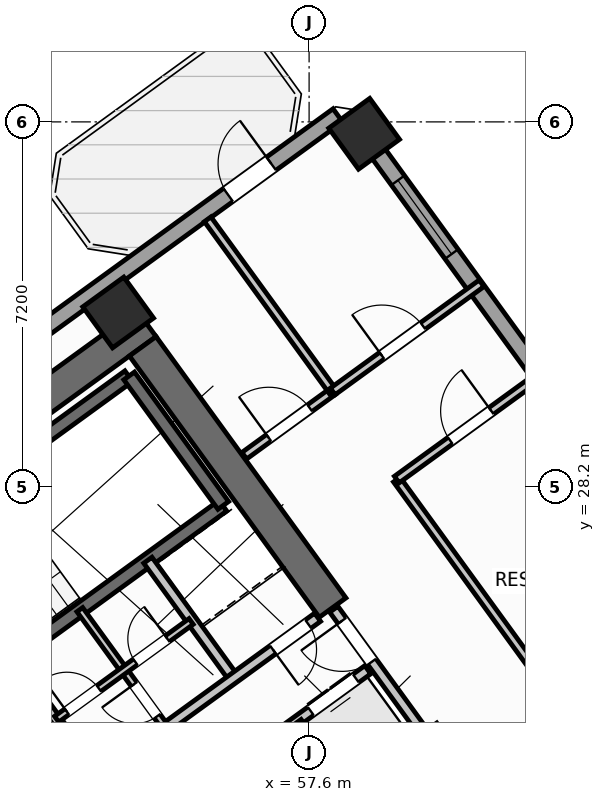
"""IFC4 building model, lengths in metres.
Left out: names, types, materials, properties, quantities, classifications, styles, units other than length and angle.
Written with IfcOpenShell. Run it as: python <this file> out.ifc"""

import sys

from ifc_helpers import new_model, si_unit, direction, frame, frame_2d, origin, origin_2d, place, context, subcontext, project, spatial, rectangle, hollow_rectangle, extrude, source, transform, mapped, element, fill, save


model = new_model("IFC4")
c1 = context("Model", 3, precision=1e-05, world=origin(), true_north=direction((0.0, 1.0)))
c2 = subcontext(c1, "Body", "Model", "MODEL_VIEW")
j1 = project(units=[si_unit("LENGTHUNIT", "METRE"), si_unit("PLANEANGLEUNIT", "RADIAN")], contexts=[c1])
p1 = place(None, origin())
s1 = spatial("IfcSite", under=j1, at=p1, CompositionType="ELEMENT")
p2 = place(p1, origin())
s2 = spatial("IfcBuilding", under=s1, at=p2, CompositionType="ELEMENT")
p3 = place(p2, frame((0.0, 0.0, 42.0)))
s3 = spatial("IfcBuildingStorey", under=s2, at=p3, CompositionType="ELEMENT", Elevation=42.0)
p4 = place(p3, frame((44.325, 24.113, 0.0), z_axis=(0.0, 0.0, 1.0), x_axis=(0.809012664862, 0.58779121131, 0.0)))
e1 = element("IfcWall", 1, at=p4, inside=s3, PredefinedType="SHEAR", context=c2, shape_type="SweptSolid", body=[
    extrude(rectangle(XDim=12.44, YDim=0.65, at=frame_2d((6.22, 0.0))), origin(), (0.0, 0.0, 1.0), 3.35),
])
p5 = place(p3, frame((58.064, 25.813, 0.0), z_axis=(0.0, 0.0, 1.0), x_axis=(-0.58777996584, 0.809020835181, 0.0)))
e2 = element("IfcWall", 2, at=p5, inside=s3, PredefinedType="SHEAR", context=c2, shape_type="SweptSolid", body=[
    extrude(rectangle(XDim=6.375, YDim=0.65, at=frame_2d((3.188, 0.0))), origin(), (0.0, 0.0, 1.0), 3.35),
])
m1 = source(origin(), c2, "Body", "SweptSolid", [
    extrude(hollow_rectangle(XDim=1.0, YDim=1.0, WallThickness=0.04, at=origin_2d()), origin(), (0.0, 0.0, 1.0), 3.6),
])
for number, where, z_axis, x_axis in (
    (3, (53.832, 31.638, 0.0), (0.0, 0.0, 1.0), (0.809, 0.588, 0.0)),
    (4, (58.686, 35.165, 0.0), (0.0, 0.0, 1.0), (0.809, 0.588, 0.0)),
):
    element("IfcColumn", number, at=place(p3, frame(where, z_axis=z_axis, x_axis=x_axis)), inside=s3, PredefinedType="COLUMN", context=c2, shape_type="MappedRepresentation", body=[
        mapped(m1, transform((0.0, 0.0, 0.0), scale=1.0)),
    ])
p6 = place(p3, frame((43.938, 25.192, 0.0), z_axis=(0.0, 0.0, 1.0), x_axis=(0.809016324578, 0.587786174187, 0.0)))
e5 = element("IfcWall", 5, at=p6, inside=s3, PredefinedType="STANDARD", context=c2, shape_type="SweptSolid", body=[
    extrude(rectangle(XDim=17.587, YDim=0.32, at=frame_2d((8.794, 0.0))), origin(), (0.0, 0.0, 1.0), 3.35),
])
p7 = place(p6, frame((14.914, 0.0, 0.0)))
e6 = element("IfcOpeningElement", 6, at=p7, cuts=e5, PredefinedType="OPENING", context=c2, shape_type="SweptSolid", body=[
    extrude(rectangle(XDim=1.05, YDim=2.15, at=frame_2d((0.525, 1.075))), frame((0.0, 0.17, 0.0), z_axis=(0.0, -1.0, 0.0), x_axis=(1.0, 0.0, 0.0)), (0.0, 0.0, 1.0), 0.34),
])
p8 = place(p6, frame((2.169, 0.0, 0.8)))
e7 = element("IfcOpeningElement", 7, at=p8, cuts=e5, PredefinedType="OPENING", context=c2, shape_type="SweptSolid", body=[
    extrude(rectangle(XDim=2.1, YDim=1.55, at=frame_2d((1.05, 0.775))), frame((0.0, 0.17, 0.0), z_axis=(0.0, -1.0, 0.0), x_axis=(1.0, 0.0, 0.0)), (0.0, 0.0, 1.0), 0.34),
])
p9 = place(p6, frame((7.319, 0.0, 0.8)))
e8 = element("IfcOpeningElement", 8, at=p9, cuts=e5, PredefinedType="OPENING", context=c2, shape_type="SweptSolid", body=[
    extrude(rectangle(XDim=2.1, YDim=1.55, at=frame_2d((1.05, 0.775))), frame((0.0, 0.17, 0.0), z_axis=(0.0, -1.0, 0.0), x_axis=(1.0, 0.0, 0.0)), (0.0, 0.0, 1.0), 0.34),
])
p10 = place(p3, frame((58.455, 35.484, 0.0), z_axis=(0.0, 0.0, 1.0), x_axis=(0.587783625747, -0.809018176127, 0.0)))
e9 = element("IfcWall", 9, at=p10, inside=s3, PredefinedType="STANDARD", context=c2, shape_type="SweptSolid", body=[
    extrude(rectangle(XDim=21.587, YDim=0.32, at=frame_2d((10.794, 0.0))), origin(), (0.0, 0.0, 1.0), 2.725),
])
p11 = place(p10, frame((1.529, 0.0, 0.85)))
e10 = element("IfcOpeningElement", 10, at=p11, cuts=e9, PredefinedType="OPENING", context=c2, shape_type="SweptSolid", body=[
    extrude(rectangle(XDim=1.8, YDim=1.5, at=frame_2d((0.9, 0.75))), frame((0.0, 0.17, 0.0), z_axis=(0.0, -1.0, 0.0), x_axis=(1.0, 0.0, 0.0)), (0.0, 0.0, 1.0), 0.34),
])
p12 = place(p10, frame((10.444, 0.0, 0.85)))
e11 = element("IfcOpeningElement", 11, at=p12, cuts=e9, PredefinedType="OPENING", context=c2, shape_type="SweptSolid", body=[
    extrude(rectangle(XDim=1.8, YDim=1.5, at=frame_2d((0.9, 0.75))), frame((0.0, 0.17, 0.0), z_axis=(0.0, -1.0, 0.0), x_axis=(1.0, 0.0, 0.0)), (0.0, 0.0, 1.0), 0.34),
])
p13 = place(p10, frame((17.595, 0.0, 0.85)))
e12 = element("IfcOpeningElement", 12, at=p13, cuts=e9, PredefinedType="OPENING", context=c2, shape_type="SweptSolid", body=[
    extrude(rectangle(XDim=1.5, YDim=1.5, at=frame_2d((0.75, 0.75))), frame((0.0, 0.17, 0.0), z_axis=(0.0, -1.0, 0.0), x_axis=(1.0, 0.0, 0.0)), (0.0, 0.0, 1.0), 0.34),
])
p14 = place(p3, frame((48.006, 25.996, 0.0), z_axis=(0.0, 0.0, 1.0), x_axis=(0.80901903764, 0.587782439969, 0.0)))
e13 = element("IfcWall", 13, at=p14, inside=s3, PredefinedType="SHEAR", context=c2, shape_type="SweptSolid", body=[
    extrude(rectangle(XDim=7.46, YDim=0.26, at=frame_2d((3.73, 0.0))), origin(), (0.0, 0.0, 1.0), 3.35),
])
p15 = place(p3, frame((49.863, 23.44, 0.0), z_axis=(0.0, 0.0, 1.0), x_axis=(0.809003474932, 0.587803859759, 0.0)))
e14 = element("IfcWall", 14, at=p15, inside=s3, PredefinedType="SHEAR", context=c2, shape_type="SweptSolid", body=[
    extrude(rectangle(XDim=7.46, YDim=0.26, at=frame_2d((3.73, 0.0))), origin(), (0.0, 0.0, 1.0), 3.35),
])
p16 = place(p15, frame((0.36, 0.0, 0.0)))
e15 = element("IfcOpeningElement", 15, at=p16, cuts=e14, PredefinedType="OPENING", context=c2, shape_type="SweptSolid", body=[
    extrude(rectangle(XDim=0.86, YDim=2.05, at=frame_2d((0.43, 1.025))), frame((0.0, 0.14, 0.0), z_axis=(0.0, -1.0, 0.0), x_axis=(1.0, 0.0, 0.0)), (0.0, 0.0, 1.0), 0.28),
])
p17 = place(p3, frame((55.906, 27.831, 0.0), z_axis=(0.0, 0.0, 1.0), x_axis=(-0.587804123638, 0.809003283204, 0.0)))
e16 = element("IfcWall", 16, at=p17, inside=s3, PredefinedType="SHEAR", context=c2, shape_type="SweptSolid", body=[
    extrude(rectangle(XDim=3.16, YDim=0.26, at=frame_2d((1.58, 0.0))), origin(), (0.0, 0.0, 1.0), 3.35),
])
p18 = place(p3, frame((54.421, 21.436, 0.0), z_axis=(0.0, 0.0, 1.0), x_axis=(0.809013710463, 0.587789772183, 0.0)))
e17 = element("IfcWall", 17, at=p18, inside=s3, PredefinedType="STANDARD", context=c2, shape_type="SweptSolid", body=[
    extrude(rectangle(XDim=5.36, YDim=0.2, at=frame_2d((2.68, 0.0))), origin(), (0.0, 0.0, 1.0), 3.34),
])
p19 = place(p18, frame((0.37, 0.0, 0.0)))
e18 = element("IfcOpeningElement", 18, at=p19, cuts=e17, PredefinedType="OPENING", context=c2, shape_type="SweptSolid", body=[
    extrude(rectangle(XDim=1.1, YDim=2.15, at=frame_2d((0.55, 1.075))), frame((0.0, 0.11, 0.0), z_axis=(0.0, -1.0, 0.0), x_axis=(1.0, 0.0, 0.0)), (0.0, 0.0, 1.0), 0.22),
])
p20 = place(p18, frame((2.17, 0.0, 0.0)))
e19 = element("IfcOpeningElement", 19, at=p20, cuts=e17, PredefinedType="OPENING", context=c2, shape_type="SweptSolid", body=[
    extrude(rectangle(XDim=1.1, YDim=2.15, at=frame_2d((0.55, 1.075))), frame((0.0, 0.11, 0.0), z_axis=(0.0, -1.0, 0.0), x_axis=(1.0, 0.0, 0.0)), (0.0, 0.0, 1.0), 0.22),
])
p21 = place(p18, frame((3.97, 0.0, 0.0)))
e20 = element("IfcOpeningElement", 20, at=p21, cuts=e17, PredefinedType="OPENING", context=c2, shape_type="SweptSolid", body=[
    extrude(rectangle(XDim=1.1, YDim=2.15, at=frame_2d((0.55, 1.075))), frame((0.0, 0.11, 0.0), z_axis=(0.0, -1.0, 0.0), x_axis=(1.0, 0.0, 0.0)), (0.0, 0.0, 1.0), 0.22),
])
p22 = place(p3, frame((58.29, 22.27, 0.0), z_axis=(0.0, 0.0, 1.0), x_axis=(-0.587840865826, 0.808976585857, 0.0)))
e21 = element("IfcWall", 21, at=p22, inside=s3, PredefinedType="STANDARD", context=c2, shape_type="SweptSolid", body=[
    extrude(rectangle(XDim=1.58, YDim=0.2, at=frame_2d((0.79, 0.0))), origin(), (0.0, 0.0, 1.0), 3.34),
])
p23 = place(p3, frame((53.425, 22.468, 0.0), z_axis=(0.0, 0.0, 1.0), x_axis=(-0.5877230039, 0.809062216821, 0.0)))
e22 = element("IfcWall", 22, at=p23, inside=s3, PredefinedType="STANDARD", context=c2, shape_type="SweptSolid", body=[
    extrude(rectangle(XDim=2.88, YDim=0.2, at=frame_2d((1.44, 0.0))), origin(), (0.0, 0.0, 1.0), 3.34),
])
p24 = place(p3, frame((56.111, 24.419, 0.0), z_axis=(0.0, 0.0, 1.0), x_axis=(-0.58777848983, 0.809021907548, 0.0)))
e23 = element("IfcWall", 23, at=p24, inside=s3, PredefinedType="STANDARD", context=c2, shape_type="SweptSolid", body=[
    extrude(rectangle(XDim=2.88, YDim=0.2, at=frame_2d((1.44, 0.0))), origin(), (0.0, 0.0, 1.0), 3.34),
])
p25 = place(p3, frame((53.425, 22.468, 0.0), z_axis=(0.0, 0.0, 1.0), x_axis=(0.80902705128, 0.587771409902, 0.0)))
e24 = element("IfcWall", 24, at=p25, inside=s3, PredefinedType="STANDARD", context=c2, shape_type="SweptSolid", body=[
    extrude(rectangle(XDim=5.368, YDim=0.2, at=frame_2d((2.684, 0.0))), origin(), (0.0, 0.0, 1.0), 3.34),
])
p26 = place(p25, frame((4.28, 0.0, 0.0)))
e25 = element("IfcOpeningElement", 25, at=p26, cuts=e24, PredefinedType="OPENING", context=c2, shape_type="SweptSolid", body=[
    extrude(rectangle(XDim=0.86, YDim=2.05, at=frame_2d((0.43, 1.025))), frame((0.0, 0.11, 0.0), z_axis=(0.0, -1.0, 0.0), x_axis=(1.0, 0.0, 0.0)), (0.0, 0.0, 1.0), 0.22),
])
p27 = place(p25, frame((0.35, 0.0, 0.0)))
e26 = element("IfcOpeningElement", 26, at=p27, cuts=e24, PredefinedType="OPENING", context=c2, shape_type="SweptSolid", body=[
    extrude(rectangle(XDim=0.86, YDim=2.05, at=frame_2d((0.43, 1.025))), frame((0.0, 0.11, 0.0), z_axis=(0.0, -1.0, 0.0), x_axis=(1.0, 0.0, 0.0)), (0.0, 0.0, 1.0), 0.22),
])
p28 = place(p3, frame((54.768, 23.443, 0.0), z_axis=(0.0, 0.0, 1.0), x_axis=(-0.587736077749, 0.809052719489, 0.0)))
e27 = element("IfcWall", 27, at=p28, inside=s3, PredefinedType="PLUMBINGWALL", context=c2, shape_type="SweptSolid", body=[
    extrude(rectangle(XDim=1.4, YDim=0.14, at=frame_2d((0.7, 0.0))), origin(), (0.0, 0.0, 1.0), 3.34),
])
p29 = place(p28, frame((0.28, 0.0, 0.0)))
e28 = element("IfcOpeningElement", 28, at=p29, cuts=e27, PredefinedType="OPENING", context=c2, shape_type="SweptSolid", body=[
    extrude(rectangle(XDim=0.78, YDim=2.05, at=frame_2d((0.39, 1.025))), frame((0.0, 0.08, 0.0), z_axis=(0.0, -1.0, 0.0), x_axis=(1.0, 0.0, 0.0)), (0.0, 0.0, 1.0), 0.16),
])
p30 = place(p3, frame((53.945, 24.576, 0.0), z_axis=(0.0, 0.0, 1.0), x_axis=(-0.587897037186, 0.808935766095, 0.0)))
e29 = element("IfcWall", 29, at=p30, inside=s3, PredefinedType="PLUMBINGWALL", context=c2, shape_type="SweptSolid", body=[
    extrude(rectangle(XDim=1.48, YDim=0.14, at=frame_2d((0.74, 0.0))), origin(), (0.0, 0.0, 1.0), 3.34),
])
p31 = place(p3, frame((52.618, 23.612, 0.0), z_axis=(0.0, 0.0, 1.0), x_axis=(0.809009587469, 0.587795446889, 0.0)))
e30 = element("IfcWall", 30, at=p31, inside=s3, PredefinedType="PLUMBINGWALL", context=c2, shape_type="SweptSolid", body=[
    extrude(rectangle(XDim=3.28, YDim=0.14, at=frame_2d((1.64, 0.0))), origin(), (0.0, 0.0, 1.0), 3.34),
])
p32 = place(p31, frame((0.25, 0.0, 0.0)))
e31 = element("IfcOpeningElement", 31, at=p32, cuts=e30, PredefinedType="OPENING", context=c2, shape_type="SweptSolid", body=[
    extrude(rectangle(XDim=0.78, YDim=2.05, at=frame_2d((0.39, 1.025))), frame((0.0, 0.08, 0.0), z_axis=(0.0, -1.0, 0.0), x_axis=(1.0, 0.0, 0.0)), (0.0, 0.0, 1.0), 0.16),
])
p33 = place(p31, frame((1.92, 0.0, 0.0)))
e32 = element("IfcOpeningElement", 32, at=p33, cuts=e30, PredefinedType="OPENING", context=c2, shape_type="SweptSolid", body=[
    extrude(rectangle(XDim=0.78, YDim=2.05, at=frame_2d((0.39, 1.025))), frame((0.0, 0.08, 0.0), z_axis=(0.0, -1.0, 0.0), x_axis=(1.0, 0.0, 0.0)), (0.0, 0.0, 1.0), 0.16),
])
p34 = place(p3, frame((59.827, 23.386, 0.0), z_axis=(0.0, 0.0, 1.0), x_axis=(-0.587803840107, 0.809003489211, 0.0)))
e33 = element("IfcWall", 33, at=p34, inside=s3, PredefinedType="STANDARD", context=c2, shape_type="SweptSolid", body=[
    extrude(rectangle(XDim=2.96, YDim=0.2, at=frame_2d((1.48, 0.0))), origin(), (0.0, 0.0, 1.0), 3.34),
])
p35 = place(p34, frame((1.68, 0.0, 0.0)))
e34 = element("IfcOpeningElement", 34, at=p35, cuts=e33, PredefinedType="OPENING", context=c2, shape_type="SweptSolid", body=[
    extrude(rectangle(XDim=1.0, YDim=2.1, at=frame_2d((0.5, 1.05))), frame((0.0, 0.11, 0.0), z_axis=(0.0, -1.0, 0.0), x_axis=(1.0, 0.0, 0.0)), (0.0, 0.0, 1.0), 0.22),
])
p36 = place(p3, frame((56.321, 28.812, 0.0), z_axis=(0.0, 0.0, 1.0), x_axis=(0.809029482429, 0.587768063577, 0.0)))
e35 = element("IfcWall", 35, at=p36, inside=s3, PredefinedType="PARTITIONING", context=c2, shape_type="SweptSolid", body=[
    extrude(rectangle(XDim=2.158, YDim=0.16, at=frame_2d((1.079, 0.0))), origin(), (0.0, 0.0, 1.0), 3.34),
])
p37 = place(p36, frame((0.598, 0.0, 0.0)))
e36 = element("IfcOpeningElement", 36, at=p37, cuts=e35, PredefinedType="OPENING", context=c2, shape_type="SweptSolid", body=[
    extrude(rectangle(XDim=1.0, YDim=2.1, at=frame_2d((0.5, 1.05))), frame((0.0, 0.09, 0.0), z_axis=(0.0, -1.0, 0.0), x_axis=(1.0, 0.0, 0.0)), (0.0, 0.0, 1.0), 0.18),
])
p38 = place(p3, frame((68.353, 15.922, 0.0), z_axis=(0.0, 0.0, 1.0), x_axis=(-0.587782002009, 0.809019355834, 0.0)))
e37 = element("IfcWall", 37, at=p38, inside=s3, PredefinedType="PARTITIONING", context=c2, shape_type="SweptSolid", body=[
    extrude(rectangle(XDim=15.35, YDim=0.16, at=frame_2d((7.675, 0.0))), origin(), (0.0, 0.0, 1.0), 3.34),
])
p39 = place(p3, frame((58.067, 30.08, 0.0), z_axis=(0.0, 0.0, 1.0), x_axis=(-0.587812175236, 0.808997433027, 0.0)))
e38 = element("IfcWall", 38, at=p39, inside=s3, PredefinedType="PARTITIONING", context=c2, shape_type="SweptSolid", body=[
    extrude(rectangle(XDim=4.2, YDim=0.16, at=frame_2d((2.1, 0.0))), origin(), (0.0, 0.0, 1.0), 3.34),
])
p40 = place(p3, frame((59.331, 28.341, 0.0), z_axis=(0.0, 0.0, 1.0), x_axis=(0.809003564202, 0.587803736896, 0.0)))
e39 = element("IfcWall", 39, at=p40, inside=s3, PredefinedType="PARTITIONING", context=c2, shape_type="SweptSolid", body=[
    extrude(rectangle(XDim=3.63, YDim=0.16, at=frame_2d((1.815, 0.0))), origin(), (0.0, 0.0, 1.0), 3.34),
])
p41 = place(p40, frame((1.305, 0.0, 0.0)))
e40 = element("IfcOpeningElement", 40, at=p41, cuts=e39, PredefinedType="OPENING", context=c2, shape_type="SweptSolid", body=[
    extrude(rectangle(XDim=1.0, YDim=2.1, at=frame_2d((0.5, 1.05))), frame((0.0, 0.09, 0.0), z_axis=(0.0, -1.0, 0.0), x_axis=(1.0, 0.0, 0.0)), (0.0, 0.0, 1.0), 0.18),
])
p42 = place(p3, frame((58.067, 30.08, 0.0), z_axis=(0.0, 0.0, 1.0), x_axis=(0.809012309495, 0.587791700422, 0.0)))
e41 = element("IfcWall", 41, at=p42, inside=s3, PredefinedType="PARTITIONING", context=c2, shape_type="SweptSolid", body=[
    extrude(rectangle(XDim=3.63, YDim=0.16, at=frame_2d((1.815, 0.0))), origin(), (0.0, 0.0, 1.0), 3.34),
])
p43 = place(p42, frame((1.2, 0.0, 0.0)))
e42 = element("IfcOpeningElement", 42, at=p43, cuts=e41, PredefinedType="OPENING", context=c2, shape_type="SweptSolid", body=[
    extrude(rectangle(XDim=1.0, YDim=2.1, at=frame_2d((0.5, 1.05))), frame((0.0, 0.09, 0.0), z_axis=(0.0, -1.0, 0.0), x_axis=(1.0, 0.0, 0.0)), (0.0, 0.0, 1.0), 0.18),
])
m2 = source(origin(), c2, "Body", "SweptSolid", [
    extrude(rectangle(XDim=1.05, YDim=2.15, at=frame_2d((0.525, 1.075))), frame((0.0, 0.025, 0.0), z_axis=(0.0, -1.0, 0.0), x_axis=(1.0, 0.0, 0.0)), (0.0, 0.0, 1.0), 0.05),
])
p44 = place(p7, origin())
e43 = element("IfcDoor", 43, at=p44, inside=s3, OperationType="SINGLE_SWING_RIGHT", PredefinedType="DOOR", context=c2, shape_type="MappedRepresentation", body=[
    mapped(m2, transform((0.0, 0.0, 0.0), scale=1.0)),
])
fill(e6, e43)
m3 = source(origin(), c2, "Body", "SweptSolid", [
    extrude(rectangle(XDim=1.8, YDim=1.5, at=frame_2d((0.9, 0.75))), frame((0.0, 0.03, 0.0), z_axis=(0.0, -1.0, 0.0), x_axis=(1.0, 0.0, 0.0)), (0.0, 0.0, 1.0), 0.06),
])
p45 = place(p11, origin())
e44 = element("IfcWindow", 44, at=p45, inside=s3, PartitioningType="SINGLE_PANEL", PredefinedType="WINDOW", context=c2, shape_type="MappedRepresentation", body=[
    mapped(m3, transform((0.0, 0.0, 0.0), scale=1.0)),
])
fill(e10, e44)
m4 = source(origin(), c2, "Body", "SweptSolid", [
    extrude(rectangle(XDim=1.1, YDim=2.15, at=frame_2d((0.55, 1.075))), frame((0.0, 0.025, 0.0), z_axis=(0.0, -1.0, 0.0), x_axis=(1.0, 0.0, 0.0)), (0.0, 0.0, 1.0), 0.05),
])
p46 = place(p21, origin())
e45 = element("IfcDoor", 45, at=p46, inside=s3, OperationType="DOUBLE_DOOR_SLIDING", PredefinedType="DOOR", context=c2, shape_type="MappedRepresentation", body=[
    mapped(m4, transform((0.0, 0.0, 0.0), scale=1.0)),
])
fill(e20, e45)
m5 = source(origin(), c2, "Body", "SweptSolid", [
    extrude(rectangle(XDim=0.86, YDim=2.05, at=frame_2d((0.43, 1.025))), frame((0.0, 0.025, 0.0), z_axis=(0.0, -1.0, 0.0), x_axis=(1.0, 0.0, 0.0)), (0.0, 0.0, 1.0), 0.05),
])
p47 = place(p26, frame((0.86, 0.0, 0.0), z_axis=(0.0, 0.0, 1.0), x_axis=(-1.0, 0.0, 0.0)))
e46 = element("IfcDoor", 46, at=p47, inside=s3, OperationType="SINGLE_SWING_RIGHT", PredefinedType="DOOR", context=c2, shape_type="MappedRepresentation", body=[
    mapped(m5, transform((0.0, 0.0, 0.0), scale=1.0)),
])
fill(e25, e46)
m6 = source(origin(), c2, "Body", "SweptSolid", [
    extrude(rectangle(XDim=0.78, YDim=2.05, at=frame_2d((0.39, 1.025))), frame((0.0, 0.025, 0.0), z_axis=(0.0, -1.0, 0.0), x_axis=(1.0, 0.0, 0.0)), (0.0, 0.0, 1.0), 0.05),
])
p48 = place(p29, origin())
e47 = element("IfcDoor", 47, at=p48, inside=s3, OperationType="SINGLE_SWING_RIGHT", PredefinedType="DOOR", context=c2, shape_type="MappedRepresentation", body=[
    mapped(m6, transform((0.0, 0.0, 0.0), scale=1.0)),
])
fill(e28, e47)
p49 = place(p32, origin())
e48 = element("IfcDoor", 48, at=p49, inside=s3, OperationType="SINGLE_SWING_LEFT", PredefinedType="DOOR", context=c2, shape_type="MappedRepresentation", body=[
    mapped(m6, transform((0.0, 0.0, 0.0), scale=1.0)),
])
fill(e31, e48)
p50 = place(p33, origin())
e49 = element("IfcDoor", 49, at=p50, inside=s3, OperationType="SINGLE_SWING_RIGHT", PredefinedType="DOOR", context=c2, shape_type="MappedRepresentation", body=[
    mapped(m6, transform((0.0, 0.0, 0.0), scale=1.0)),
])
fill(e32, e49)
m7 = source(origin(), c2, "Body", "SweptSolid", [
    extrude(rectangle(XDim=1.0, YDim=2.1, at=frame_2d((0.5, 1.05))), frame((0.0, 0.025, 0.0), z_axis=(0.0, -1.0, 0.0), x_axis=(1.0, 0.0, 0.0)), (0.0, 0.0, 1.0), 0.05),
])
p51 = place(p37, origin())
e50 = element("IfcDoor", 50, at=p51, inside=s3, OperationType="SINGLE_SWING_LEFT", PredefinedType="DOOR", context=c2, shape_type="MappedRepresentation", body=[
    mapped(m7, transform((0.0, 0.0, 0.0), scale=1.0)),
])
fill(e36, e50)
p52 = place(p35, origin())
e51 = element("IfcDoor", 51, at=p52, inside=s3, OperationType="SINGLE_SWING_RIGHT", PredefinedType="DOOR", context=c2, shape_type="MappedRepresentation", body=[
    mapped(m7, transform((0.0, 0.0, 0.0), scale=1.0)),
])
fill(e34, e51)
p53 = place(p43, origin())
e52 = element("IfcDoor", 52, at=p53, inside=s3, OperationType="SINGLE_SWING_LEFT", PredefinedType="DOOR", context=c2, shape_type="MappedRepresentation", body=[
    mapped(m7, transform((0.0, 0.0, 0.0), scale=1.0)),
])
fill(e42, e52)
p54 = place(p41, origin())
e53 = element("IfcDoor", 53, at=p54, inside=s3, OperationType="SINGLE_SWING_RIGHT", PredefinedType="DOOR", context=c2, shape_type="MappedRepresentation", body=[
    mapped(m7, transform((0.0, 0.0, 0.0), scale=1.0)),
])
fill(e40, e53)
save(model, sys.argv[1])
